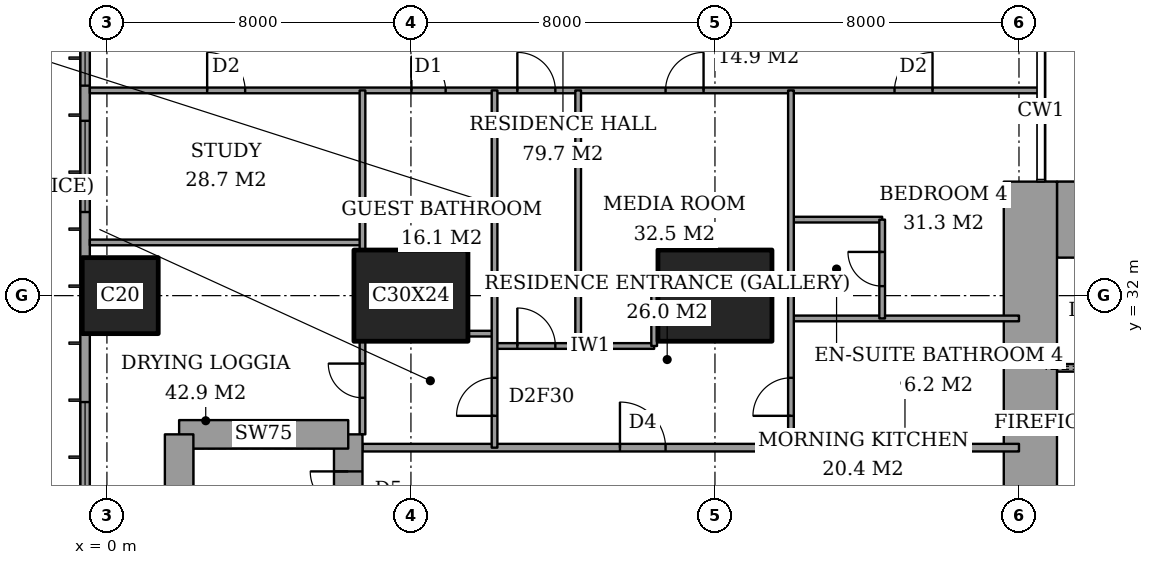
"""IFC4 building model, lengths in metres.
Left out: names, types, materials, properties, quantities, classifications, styles, units other than length and angle.
Written with IfcOpenShell. Run it as: python <this file> out.ifc"""

import sys

from ifc_helpers import new_model, si_unit, direction, frame, frame_2d, origin, origin_2d, place, context, subcontext, project, spatial, rectangle, extrude, element, fill, save


model = new_model("IFC4")
c1 = context("Model", 3, precision=1e-05, world=origin(), true_north=direction((0.0, 1.0)))
c2 = subcontext(c1, "Body", "Model", "MODEL_VIEW")
j1 = project(units=[si_unit("LENGTHUNIT", "METRE"), si_unit("PLANEANGLEUNIT", "RADIAN")], contexts=[c1])
p1 = place(None, origin())
s1 = spatial("IfcSite", under=j1, at=p1, CompositionType="ELEMENT")
p2 = place(p1, origin())
s2 = spatial("IfcBuilding", under=s1, at=p2, CompositionType="ELEMENT")
p3 = place(p2, frame((0.0, 0.0, 121.4)))
s3 = spatial("IfcBuildingStorey", under=s2, at=p3, CompositionType="ELEMENT", Elevation=121.4)
p4 = place(p3, frame((0.35, 32.0, 0.0), z_axis=(0.0, 0.0, 1.0), x_axis=(1.0, 0.0, 0.0)))
e1 = element("IfcColumn", 1, at=p4, inside=s3, PredefinedType="COLUMN", context=c2, shape_type="SweptSolid", body=[
    extrude(rectangle(XDim=2.0, YDim=2.0, at=origin_2d()), origin(), (0.0, 0.0, 1.0), 3.6),
])
for number, where, z_axis, x_axis in (
    (2, (8.0, 32.0, 0.0), (0.0, 0.0, 1.0), (1.0, 0.0, 0.0)),
    (3, (16.0, 32.0, 0.0), (0.0, 0.0, 1.0), (1.0, 0.0, 0.0)),
):
    element("IfcColumn", number, at=place(p3, frame(where, z_axis=z_axis, x_axis=x_axis)), inside=s3, PredefinedType="COLUMN", context=c2, shape_type="SweptSolid", body=[
        extrude(rectangle(XDim=3.0, YDim=2.4, at=origin_2d()), origin(), (0.0, 0.0, 1.0), 3.6),
    ])
p5 = place(p3, frame((25.0, 34.0, 0.0), z_axis=(0.0, 0.0, 1.0), x_axis=(1.0, 0.0, 0.0)))
e4 = element("IfcWall", 4, at=p5, inside=s3, PredefinedType="SHEAR", context=c2, shape_type="SweptSolid", body=[
    extrude(rectangle(XDim=3.15, YDim=2.0, at=frame_2d((1.575, 0.0))), origin(), (0.0, 0.0, 1.0), 3.6),
])
p6 = place(p3, frame((24.3, 23.15, 0.0), z_axis=(0.0, 0.0, 1.0), x_axis=(0.0, 1.0, 0.0)))
e5 = element("IfcWall", 5, at=p6, inside=s3, PredefinedType="SHEAR", context=c2, shape_type="SweptSolid", body=[
    extrude(rectangle(XDim=11.85, YDim=1.4, at=frame_2d((5.925, 0.0))), origin(), (0.0, 0.0, 1.0), 3.6),
])
p7 = place(p6, frame((0.75, 0.0, 0.0)))
e6 = element("IfcOpeningElement", 6, at=p7, cuts=e5, PredefinedType="OPENING", context=c2, shape_type="SweptSolid", body=[
    extrude(rectangle(XDim=1.8, YDim=2.4, at=frame_2d((0.9, 1.2))), frame((0.0, 0.71, 0.0), z_axis=(0.0, -1.0, 0.0), x_axis=(1.0, 0.0, 0.0)), (0.0, 0.0, 1.0), 1.42),
])
p8 = place(p3, frame((6.35, 19.65, 0.0), z_axis=(0.0, 0.0, 1.0), x_axis=(0.0, 1.0, 0.0)))
e7 = element("IfcWall", 7, at=p8, inside=s3, PredefinedType="SHEAR", context=c2, shape_type="SweptSolid", body=[
    extrude(rectangle(XDim=8.7, YDim=0.75, at=frame_2d((4.35, 0.0))), origin(), (0.0, 0.0, 1.0), 3.6),
])
p9 = place(p8, frame((6.725, 0.0, 0.0)))
e8 = element("IfcOpeningElement", 8, at=p9, cuts=e7, PredefinedType="OPENING", context=c2, shape_type="SweptSolid", body=[
    extrude(rectangle(XDim=1.0, YDim=2.1, at=frame_2d((0.5, 1.05))), frame((0.0, 0.385, 0.0), z_axis=(0.0, -1.0, 0.0), x_axis=(1.0, 0.0, 0.0)), (0.0, 0.0, 1.0), 0.77),
])
p10 = place(p3, frame((6.35, 28.35, 0.0), z_axis=(0.0, 0.0, 1.0), x_axis=(-1.0, 0.0, 0.0)))
e9 = element("IfcWall", 9, at=p10, inside=s3, PredefinedType="SHEAR", context=c2, shape_type="SweptSolid", body=[
    extrude(rectangle(XDim=4.45, YDim=0.75, at=frame_2d((2.225, 0.0))), origin(), (0.0, 0.0, 1.0), 3.6),
])
p11 = place(p3, frame((1.9, 28.35, 0.0), z_axis=(0.0, 0.0, 1.0), x_axis=(0.0, -1.0, 0.0)))
e10 = element("IfcWall", 10, at=p11, inside=s3, PredefinedType="SHEAR", context=c2, shape_type="SweptSolid", body=[
    extrude(rectangle(XDim=8.7, YDim=0.75, at=frame_2d((4.35, 0.0))), origin(), (0.0, 0.0, 1.0), 3.6),
])
p12 = place(p3, frame((-0.575, 44.825, 0.0), z_axis=(0.0, 0.0, 1.0), x_axis=(0.0, -1.0, 0.0)))
e11 = element("IfcWall", 11, at=p12, inside=s3, PredefinedType="SOLIDWALL", context=c2, shape_type="SweptSolid", body=[
    extrude(rectangle(XDim=41.65, YDim=0.25, at=frame_2d((20.825, 0.0))), origin(), (0.0, 0.0, 1.0), 3.6),
])
p13 = place(p12, frame((0.775, 0.0, 0.4)))
e12 = element("IfcOpeningElement", 12, at=p13, cuts=e11, PredefinedType="OPENING", context=c2, shape_type="SweptSolid", body=[
    extrude(rectangle(XDim=2.4, YDim=2.2, at=frame_2d((1.2, 1.1))), frame((0.0, 0.135, 0.0), z_axis=(0.0, -1.0, 0.0), x_axis=(1.0, 0.0, 0.0)), (0.0, 0.0, 1.0), 0.27),
])
p14 = place(p12, frame((6.1, 0.0, 0.4)))
e13 = element("IfcOpeningElement", 13, at=p14, cuts=e11, PredefinedType="OPENING", context=c2, shape_type="SweptSolid", body=[
    extrude(rectangle(XDim=1.2, YDim=2.2, at=frame_2d((0.6, 1.1))), frame((0.0, 0.135, 0.0), z_axis=(0.0, -1.0, 0.0), x_axis=(1.0, 0.0, 0.0)), (0.0, 0.0, 1.0), 0.27),
])
p15 = place(p12, frame((8.225, 0.0, 0.4)))
e14 = element("IfcOpeningElement", 14, at=p15, cuts=e11, PredefinedType="OPENING", context=c2, shape_type="SweptSolid", body=[
    extrude(rectangle(XDim=2.4, YDim=2.2, at=frame_2d((1.2, 1.1))), frame((0.0, 0.135, 0.0), z_axis=(0.0, -1.0, 0.0), x_axis=(1.0, 0.0, 0.0)), (0.0, 0.0, 1.0), 0.27),
])
p16 = place(p12, frame((15.625, 0.0, 0.4)))
e15 = element("IfcOpeningElement", 15, at=p16, cuts=e11, PredefinedType="OPENING", context=c2, shape_type="SweptSolid", body=[
    extrude(rectangle(XDim=2.4, YDim=2.2, at=frame_2d((1.2, 1.1))), frame((0.0, 0.135, 0.0), z_axis=(0.0, -1.0, 0.0), x_axis=(1.0, 0.0, 0.0)), (0.0, 0.0, 1.0), 0.27),
])
p17 = place(p12, frame((23.625, 0.0, 0.4)))
e16 = element("IfcOpeningElement", 16, at=p17, cuts=e11, PredefinedType="OPENING", context=c2, shape_type="SweptSolid", body=[
    extrude(rectangle(XDim=2.4, YDim=2.2, at=frame_2d((1.2, 1.1))), frame((0.0, 0.135, 0.0), z_axis=(0.0, -1.0, 0.0), x_axis=(1.0, 0.0, 0.0)), (0.0, 0.0, 1.0), 0.27),
])
p18 = place(p12, frame((30.825, 0.0, 0.4)))
e17 = element("IfcOpeningElement", 17, at=p18, cuts=e11, PredefinedType="OPENING", context=c2, shape_type="SweptSolid", body=[
    extrude(rectangle(XDim=2.4, YDim=2.2, at=frame_2d((1.2, 1.1))), frame((0.0, 0.135, 0.0), z_axis=(0.0, -1.0, 0.0), x_axis=(1.0, 0.0, 0.0)), (0.0, 0.0, 1.0), 0.27),
])
p19 = place(p12, frame((34.5, 0.0, 0.4)))
e18 = element("IfcOpeningElement", 18, at=p19, cuts=e11, PredefinedType="OPENING", context=c2, shape_type="SweptSolid", body=[
    extrude(rectangle(XDim=1.2, YDim=2.2, at=frame_2d((0.6, 1.1))), frame((0.0, 0.135, 0.0), z_axis=(0.0, -1.0, 0.0), x_axis=(1.0, 0.0, 0.0)), (0.0, 0.0, 1.0), 0.27),
])
p20 = place(p12, frame((38.475, 0.0, 0.4)))
e19 = element("IfcOpeningElement", 19, at=p20, cuts=e11, PredefinedType="OPENING", context=c2, shape_type="SweptSolid", body=[
    extrude(rectangle(XDim=2.4, YDim=2.2, at=frame_2d((1.2, 1.1))), frame((0.0, 0.135, 0.0), z_axis=(0.0, -1.0, 0.0), x_axis=(1.0, 0.0, 0.0)), (0.0, 0.0, 1.0), 0.27),
])
p21 = place(p3, frame((6.725, 28.0, 0.0), z_axis=(0.0, 0.0, 1.0), x_axis=(1.0, 0.0, 0.0)))
e20 = element("IfcWall", 20, at=p21, inside=s3, PredefinedType="PARTITIONING", context=c2, shape_type="SweptSolid", body=[
    extrude(rectangle(XDim=17.275, YDim=0.2, at=frame_2d((8.637, 0.0))), origin(), (0.0, 0.0, 1.0), 3.35),
])
p22 = place(p21, frame((6.775, 0.0, 0.0)))
e21 = element("IfcOpeningElement", 21, at=p22, cuts=e20, PredefinedType="OPENING", context=c2, shape_type="SweptSolid", body=[
    extrude(rectangle(XDim=1.2, YDim=2.4, at=frame_2d((0.6, 1.2))), frame((0.0, 0.11, 0.0), z_axis=(0.0, -1.0, 0.0), x_axis=(1.0, 0.0, 0.0)), (0.0, 0.0, 1.0), 0.22),
])
p23 = place(p3, frame((10.2, 30.675, 0.0), z_axis=(0.0, 0.0, 1.0), x_axis=(1.0, 0.0, 0.0)))
e22 = element("IfcWall", 22, at=p23, inside=s3, PredefinedType="PARTITIONING", context=c2, shape_type="SweptSolid", body=[
    extrude(rectangle(XDim=4.2, YDim=0.15, at=frame_2d((2.1, 0.0))), origin(), (0.0, 0.0, 1.0), 3.35),
])
p24 = place(p23, frame((0.6, 0.0, 0.0)))
e23 = element("IfcOpeningElement", 23, at=p24, cuts=e22, PredefinedType="OPENING", context=c2, shape_type="SweptSolid", body=[
    extrude(rectangle(XDim=1.0, YDim=2.1, at=frame_2d((0.5, 1.05))), frame((0.0, 0.085, 0.0), z_axis=(0.0, -1.0, 0.0), x_axis=(1.0, 0.0, 0.0)), (0.0, 0.0, 1.0), 0.17),
])
p25 = place(p3, frame((9.5, 31.0, 0.0), z_axis=(0.0, 0.0, 1.0), x_axis=(1.0, 0.0, 0.0)))
e24 = element("IfcWall", 24, at=p25, inside=s3, PredefinedType="PARTITIONING", context=c2, shape_type="SweptSolid", body=[
    extrude(rectangle(XDim=0.7, YDim=0.15, at=frame_2d((0.35, 0.0))), origin(), (0.0, 0.0, 1.0), 3.35),
])
p26 = place(p3, frame((18.0, 31.4, 0.0), z_axis=(0.0, 0.0, 1.0), x_axis=(1.0, 0.0, 0.0)))
e25 = element("IfcWall", 25, at=p26, inside=s3, PredefinedType="PARTITIONING", context=c2, shape_type="SweptSolid", body=[
    extrude(rectangle(XDim=6.0, YDim=0.15, at=frame_2d((3.0, 0.0))), origin(), (0.0, 0.0, 1.0), 3.35),
])
p27 = place(p3, frame((17.5, 32.1, 0.0), z_axis=(0.0, 0.0, 1.0), x_axis=(1.0, 0.0, 0.0)))
e26 = element("IfcWall", 26, at=p27, inside=s3, PredefinedType="PARTITIONING", context=c2, shape_type="SweptSolid", body=[
    extrude(rectangle(XDim=0.5, YDim=0.15, at=frame_2d((0.25, 0.0))), origin(), (0.0, 0.0, 1.0), 2.634),
])
p28 = place(p3, frame((-0.45, 33.4, 0.0), z_axis=(0.0, 0.0, 1.0), x_axis=(1.0, 0.0, 0.0)))
e27 = element("IfcWall", 27, at=p28, inside=s3, PredefinedType="PARTITIONING", context=c2, shape_type="SweptSolid", body=[
    extrude(rectangle(XDim=7.175, YDim=0.15, at=frame_2d((3.587, 0.0))), origin(), (0.0, 0.0, 1.0), 3.35),
])
p29 = place(p3, frame((18.0, 34.0, 0.0), z_axis=(0.0, 0.0, 1.0), x_axis=(1.0, 0.0, 0.0)))
e28 = element("IfcWall", 28, at=p29, inside=s3, PredefinedType="PARTITIONING", context=c2, shape_type="SweptSolid", body=[
    extrude(rectangle(XDim=2.4, YDim=0.15, at=frame_2d((1.2, 0.0))), origin(), (0.0, 0.0, 1.0), 3.35),
])
p30 = place(p3, frame((-0.45, 37.4, 0.0), z_axis=(0.0, 0.0, 1.0), x_axis=(1.0, 0.0, 0.0)))
e29 = element("IfcWall", 29, at=p30, inside=s3, PredefinedType="PARTITIONING", context=c2, shape_type="SweptSolid", body=[
    extrude(rectangle(XDim=25.011, YDim=0.15, at=frame_2d((12.505, 0.0))), origin(), (0.0, 0.0, 1.0), 3.35),
])
p31 = place(p30, frame((11.25, 0.0, 0.0)))
e30 = element("IfcOpeningElement", 30, at=p31, cuts=e29, PredefinedType="OPENING", context=c2, shape_type="SweptSolid", body=[
    extrude(rectangle(XDim=1.0, YDim=2.1, at=frame_2d((0.5, 1.05))), frame((0.0, 0.085, 0.0), z_axis=(0.0, -1.0, 0.0), x_axis=(1.0, 0.0, 0.0)), (0.0, 0.0, 1.0), 0.17),
])
p32 = place(p30, frame((3.087, 0.0, 0.0)))
e31 = element("IfcOpeningElement", 31, at=p32, cuts=e29, PredefinedType="OPENING", context=c2, shape_type="SweptSolid", body=[
    extrude(rectangle(XDim=1.0, YDim=2.1, at=frame_2d((0.5, 1.05))), frame((0.0, 0.085, 0.0), z_axis=(0.0, -1.0, 0.0), x_axis=(1.0, 0.0, 0.0)), (0.0, 0.0, 1.0), 0.17),
])
p33 = place(p30, frame((8.462, 0.0, 0.0)))
e32 = element("IfcOpeningElement", 32, at=p33, cuts=e29, PredefinedType="OPENING", context=c2, shape_type="SweptSolid", body=[
    extrude(rectangle(XDim=0.9, YDim=2.1, at=frame_2d((0.45, 1.05))), frame((0.0, 0.085, 0.0), z_axis=(0.0, -1.0, 0.0), x_axis=(1.0, 0.0, 0.0)), (0.0, 0.0, 1.0), 0.17),
])
p34 = place(p30, frame((15.15, 0.0, 0.0)))
e33 = element("IfcOpeningElement", 33, at=p34, cuts=e29, PredefinedType="OPENING", context=c2, shape_type="SweptSolid", body=[
    extrude(rectangle(XDim=1.0, YDim=2.1, at=frame_2d((0.5, 1.05))), frame((0.0, 0.085, 0.0), z_axis=(0.0, -1.0, 0.0), x_axis=(1.0, 0.0, 0.0)), (0.0, 0.0, 1.0), 0.17),
])
p35 = place(p30, frame((21.175, 0.0, 0.0)))
e34 = element("IfcOpeningElement", 34, at=p35, cuts=e29, PredefinedType="OPENING", context=c2, shape_type="SweptSolid", body=[
    extrude(rectangle(XDim=1.0, YDim=2.1, at=frame_2d((0.5, 1.05))), frame((0.0, 0.085, 0.0), z_axis=(0.0, -1.0, 0.0), x_axis=(1.0, 0.0, 0.0)), (0.0, 0.0, 1.0), 0.17),
])
p36 = place(p3, frame((6.725, 28.35, 0.0), z_axis=(0.0, 0.0, 1.0), x_axis=(0.0, 1.0, 0.0)))
e35 = element("IfcWall", 35, at=p36, inside=s3, PredefinedType="PARTITIONING", context=c2, shape_type="SweptSolid", body=[
    extrude(rectangle(XDim=2.45, YDim=0.15, at=frame_2d((1.225, 0.0))), origin(), (0.0, 0.0, 1.0), 3.35),
])
p37 = place(p36, frame((0.962, 0.0, 0.0)))
e36 = element("IfcOpeningElement", 36, at=p37, cuts=e35, PredefinedType="OPENING", context=c2, shape_type="SweptSolid", body=[
    extrude(rectangle(XDim=0.9, YDim=2.1, at=frame_2d((0.45, 1.05))), frame((0.0, 0.085, 0.0), z_axis=(0.0, -1.0, 0.0), x_axis=(1.0, 0.0, 0.0)), (0.0, 0.0, 1.0), 0.17),
])
p38 = place(p3, frame((6.725, 33.2, 0.0), z_axis=(0.0, 0.0, 1.0), x_axis=(0.0, 1.0, 0.0)))
e37 = element("IfcWall", 37, at=p38, inside=s3, PredefinedType="PARTITIONING", context=c2, shape_type="SweptSolid", body=[
    extrude(rectangle(XDim=4.2, YDim=0.15, at=frame_2d((2.1, 0.0))), origin(), (0.0, 0.0, 1.0), 3.35),
])
p39 = place(p3, frame((10.2, 28.0, 0.0), z_axis=(0.0, 0.0, 1.0), x_axis=(0.0, 1.0, 0.0)))
e38 = element("IfcWall", 38, at=p39, inside=s3, PredefinedType="PARTITIONING", context=c2, shape_type="SweptSolid", body=[
    extrude(rectangle(XDim=9.4, YDim=0.15, at=frame_2d((4.7, 0.0))), origin(), (0.0, 0.0, 1.0), 3.35),
])
p40 = place(p39, frame((0.837, 0.0, 0.0)))
e39 = element("IfcOpeningElement", 39, at=p40, cuts=e38, PredefinedType="OPENING", context=c2, shape_type="SweptSolid", body=[
    extrude(rectangle(XDim=1.0, YDim=2.1, at=frame_2d((0.5, 1.05))), frame((0.0, 0.085, 0.0), z_axis=(0.0, -1.0, 0.0), x_axis=(1.0, 0.0, 0.0)), (0.0, 0.0, 1.0), 0.17),
])
p41 = place(p3, frame((12.4, 30.675, 0.0), z_axis=(0.0, 0.0, 1.0), x_axis=(0.0, 1.0, 0.0)))
e40 = element("IfcWall", 40, at=p41, inside=s3, PredefinedType="PARTITIONING", context=c2, shape_type="SweptSolid", body=[
    extrude(rectangle(XDim=6.725, YDim=0.15, at=frame_2d((3.362, 0.0))), origin(), (0.0, 0.0, 1.0), 3.35),
])
p42 = place(p3, frame((14.4, 30.675, 0.0), z_axis=(0.0, 0.0, 1.0), x_axis=(0.0, 1.0, 0.0)))
e41 = element("IfcWall", 41, at=p42, inside=s3, PredefinedType="PARTITIONING", context=c2, shape_type="SweptSolid", body=[
    extrude(rectangle(XDim=1.425, YDim=0.15, at=frame_2d((0.712, 0.0))), origin(), (0.0, 0.0, 1.0), 3.35),
])
p43 = place(p3, frame((18.0, 28.0, 0.0), z_axis=(0.0, 0.0, 1.0), x_axis=(0.0, 1.0, 0.0)))
e42 = element("IfcWall", 42, at=p43, inside=s3, PredefinedType="PARTITIONING", context=c2, shape_type="SweptSolid", body=[
    extrude(rectangle(XDim=9.4, YDim=0.15, at=frame_2d((4.7, 0.0))), origin(), (0.0, 0.0, 1.0), 3.35),
])
p44 = place(p43, frame((0.837, 0.0, 0.0)))
e43 = element("IfcOpeningElement", 43, at=p44, cuts=e42, PredefinedType="OPENING", context=c2, shape_type="SweptSolid", body=[
    extrude(rectangle(XDim=1.0, YDim=2.1, at=frame_2d((0.5, 1.05))), frame((0.0, 0.085, 0.0), z_axis=(0.0, -1.0, 0.0), x_axis=(1.0, 0.0, 0.0)), (0.0, 0.0, 1.0), 0.17),
])
p45 = place(p3, frame((20.4, 31.4, 0.0), z_axis=(0.0, 0.0, 1.0), x_axis=(0.0, 1.0, 0.0)))
e44 = element("IfcWall", 44, at=p45, inside=s3, PredefinedType="PARTITIONING", context=c2, shape_type="SweptSolid", body=[
    extrude(rectangle(XDim=2.6, YDim=0.15, at=frame_2d((1.3, 0.0))), origin(), (0.0, 0.0, 1.0), 3.35),
])
p46 = place(p45, frame((0.85, 0.0, 0.0)))
e45 = element("IfcOpeningElement", 45, at=p46, cuts=e44, PredefinedType="OPENING", context=c2, shape_type="SweptSolid", body=[
    extrude(rectangle(XDim=0.9, YDim=2.1, at=frame_2d((0.45, 1.05))), frame((0.0, 0.085, 0.0), z_axis=(0.0, -1.0, 0.0), x_axis=(1.0, 0.0, 0.0)), (0.0, 0.0, 1.0), 0.17),
])
p47 = place(p3, frame((25.0, 30.1, 0.0), z_axis=(0.0, 0.0, 1.0), x_axis=(1.0, 0.0, 0.0)))
e46 = element("IfcWall", 46, at=p47, inside=s3, PredefinedType="PARTITIONING", context=c2, shape_type="SweptSolid", body=[
    extrude(rectangle(XDim=12.7, YDim=0.2, at=frame_2d((6.35, 0.0))), origin(), (0.0, 0.0, 1.0), 3.6),
])
p48 = place(p47, frame((0.9, 0.0, 0.0)))
e47 = element("IfcOpeningElement", 47, at=p48, cuts=e46, PredefinedType="OPENING", context=c2, shape_type="SweptSolid", body=[
    extrude(rectangle(XDim=1.2, YDim=2.1, at=frame_2d((0.6, 1.05))), frame((0.0, 0.11, 0.0), z_axis=(0.0, -1.0, 0.0), x_axis=(1.0, 0.0, 0.0)), (0.0, 0.0, 1.0), 0.22),
])
p49 = place(p14, origin())
e48 = element("IfcWindow", 48, at=p49, inside=s3, PartitioningType="SINGLE_PANEL", PredefinedType="WINDOW", context=c2, shape_type="SweptSolid", body=[
    extrude(rectangle(XDim=1.2, YDim=2.2, at=frame_2d((0.6, 1.1))), frame((0.0, 0.03, 0.0), z_axis=(0.0, -1.0, 0.0), x_axis=(1.0, 0.0, 0.0)), (0.0, 0.0, 1.0), 0.06),
])
fill(e13, e48)
p50 = place(p15, origin())
e49 = element("IfcWindow", 49, at=p50, inside=s3, PartitioningType="SINGLE_PANEL", PredefinedType="WINDOW", context=c2, shape_type="SweptSolid", body=[
    extrude(rectangle(XDim=2.4, YDim=2.2, at=frame_2d((1.2, 1.1))), frame((0.0, 0.03, 0.0), z_axis=(0.0, -1.0, 0.0), x_axis=(1.0, 0.0, 0.0)), (0.0, 0.0, 1.0), 0.06),
])
fill(e14, e49)
p51 = place(p16, origin())
e50 = element("IfcWindow", 50, at=p51, inside=s3, PartitioningType="SINGLE_PANEL", PredefinedType="WINDOW", context=c2, shape_type="SweptSolid", body=[
    extrude(rectangle(XDim=2.4, YDim=2.2, at=frame_2d((1.2, 1.1))), frame((0.0, 0.03, 0.0), z_axis=(0.0, -1.0, 0.0), x_axis=(1.0, 0.0, 0.0)), (0.0, 0.0, 1.0), 0.06),
])
fill(e15, e50)
p52 = place(p31, origin())
e51 = element("IfcDoor", 51, at=p52, inside=s3, OperationType="SINGLE_SWING_RIGHT", PredefinedType="DOOR", context=c2, shape_type="SweptSolid", body=[
    extrude(rectangle(XDim=1.0, YDim=2.1, at=frame_2d((0.5, 1.05))), frame((0.0, 0.025, 0.0), z_axis=(0.0, -1.0, 0.0), x_axis=(1.0, 0.0, 0.0)), (0.0, 0.0, 1.0), 0.05),
])
fill(e30, e51)
p53 = place(p32, origin())
e52 = element("IfcDoor", 52, at=p53, inside=s3, OperationType="SINGLE_SWING_RIGHT", PredefinedType="DOOR", context=c2, shape_type="SweptSolid", body=[
    extrude(rectangle(XDim=1.0, YDim=2.1, at=frame_2d((0.5, 1.05))), frame((0.0, 0.025, 0.0), z_axis=(0.0, -1.0, 0.0), x_axis=(1.0, 0.0, 0.0)), (0.0, 0.0, 1.0), 0.05),
])
fill(e31, e52)
p54 = place(p37, origin())
e53 = element("IfcDoor", 53, at=p54, inside=s3, OperationType="SINGLE_SWING_LEFT", PredefinedType="DOOR", context=c2, shape_type="SweptSolid", body=[
    extrude(rectangle(XDim=0.9, YDim=2.1, at=frame_2d((0.45, 1.05))), frame((0.0, 0.025, 0.0), z_axis=(0.0, -1.0, 0.0), x_axis=(1.0, 0.0, 0.0)), (0.0, 0.0, 1.0), 0.05),
])
fill(e36, e53)
p55 = place(p33, origin())
e54 = element("IfcDoor", 54, at=p55, inside=s3, OperationType="SINGLE_SWING_RIGHT", PredefinedType="DOOR", context=c2, shape_type="SweptSolid", body=[
    extrude(rectangle(XDim=0.9, YDim=2.1, at=frame_2d((0.45, 1.05))), frame((0.0, 0.025, 0.0), z_axis=(0.0, -1.0, 0.0), x_axis=(1.0, 0.0, 0.0)), (0.0, 0.0, 1.0), 0.05),
])
fill(e32, e54)
p56 = place(p40, origin())
e55 = element("IfcDoor", 55, at=p56, inside=s3, OperationType="SINGLE_SWING_RIGHT", PredefinedType="DOOR", context=c2, shape_type="SweptSolid", body=[
    extrude(rectangle(XDim=1.0, YDim=2.1, at=frame_2d((0.5, 1.05))), frame((0.0, 0.025, 0.0), z_axis=(0.0, -1.0, 0.0), x_axis=(1.0, 0.0, 0.0)), (0.0, 0.0, 1.0), 0.05),
])
fill(e39, e55)
p57 = place(p22, origin())
e56 = element("IfcDoor", 56, at=p57, inside=s3, OperationType="SINGLE_SWING_RIGHT", PredefinedType="DOOR", context=c2, shape_type="SweptSolid", body=[
    extrude(rectangle(XDim=1.2, YDim=2.4, at=frame_2d((0.6, 1.2))), frame((0.0, 0.025, 0.0), z_axis=(0.0, -1.0, 0.0), x_axis=(1.0, 0.0, 0.0)), (0.0, 0.0, 1.0), 0.05),
])
fill(e21, e56)
p58 = place(p24, origin())
e57 = element("IfcDoor", 57, at=p58, inside=s3, OperationType="SINGLE_SWING_RIGHT", PredefinedType="DOOR", context=c2, shape_type="SweptSolid", body=[
    extrude(rectangle(XDim=1.0, YDim=2.1, at=frame_2d((0.5, 1.05))), frame((0.0, 0.025, 0.0), z_axis=(0.0, -1.0, 0.0), x_axis=(1.0, 0.0, 0.0)), (0.0, 0.0, 1.0), 0.05),
])
fill(e23, e57)
p59 = place(p34, origin())
e58 = element("IfcDoor", 58, at=p59, inside=s3, OperationType="SINGLE_SWING_LEFT", PredefinedType="DOOR", context=c2, shape_type="SweptSolid", body=[
    extrude(rectangle(XDim=1.0, YDim=2.1, at=frame_2d((0.5, 1.05))), frame((0.0, 0.025, 0.0), z_axis=(0.0, -1.0, 0.0), x_axis=(1.0, 0.0, 0.0)), (0.0, 0.0, 1.0), 0.05),
])
fill(e33, e58)
p60 = place(p46, origin())
e59 = element("IfcDoor", 59, at=p60, inside=s3, OperationType="SINGLE_SWING_LEFT", PredefinedType="DOOR", context=c2, shape_type="SweptSolid", body=[
    extrude(rectangle(XDim=0.9, YDim=2.1, at=frame_2d((0.45, 1.05))), frame((0.0, 0.025, 0.0), z_axis=(0.0, -1.0, 0.0), x_axis=(1.0, 0.0, 0.0)), (0.0, 0.0, 1.0), 0.05),
])
fill(e45, e59)
p61 = place(p35, origin())
e60 = element("IfcDoor", 60, at=p61, inside=s3, OperationType="SINGLE_SWING_LEFT", PredefinedType="DOOR", context=c2, shape_type="SweptSolid", body=[
    extrude(rectangle(XDim=1.0, YDim=2.1, at=frame_2d((0.5, 1.05))), frame((0.0, 0.025, 0.0), z_axis=(0.0, -1.0, 0.0), x_axis=(1.0, 0.0, 0.0)), (0.0, 0.0, 1.0), 0.05),
])
fill(e34, e60)
p62 = place(p44, origin())
e61 = element("IfcDoor", 61, at=p62, inside=s3, OperationType="SINGLE_SWING_RIGHT", PredefinedType="DOOR", context=c2, shape_type="SweptSolid", body=[
    extrude(rectangle(XDim=1.0, YDim=2.1, at=frame_2d((0.5, 1.05))), frame((0.0, 0.025, 0.0), z_axis=(0.0, -1.0, 0.0), x_axis=(1.0, 0.0, 0.0)), (0.0, 0.0, 1.0), 0.05),
])
fill(e43, e61)
p63 = place(p9, origin())
e62 = element("IfcDoor", 62, at=p63, inside=s3, OperationType="SINGLE_SWING_LEFT", PredefinedType="DOOR", context=c2, shape_type="SweptSolid", body=[
    extrude(rectangle(XDim=1.0, YDim=2.1, at=frame_2d((0.5, 1.05))), frame((0.0, 0.025, 0.0), z_axis=(0.0, -1.0, 0.0), x_axis=(1.0, 0.0, 0.0)), (0.0, 0.0, 1.0), 0.05),
])
fill(e8, e62)
save(model, sys.argv[1])
